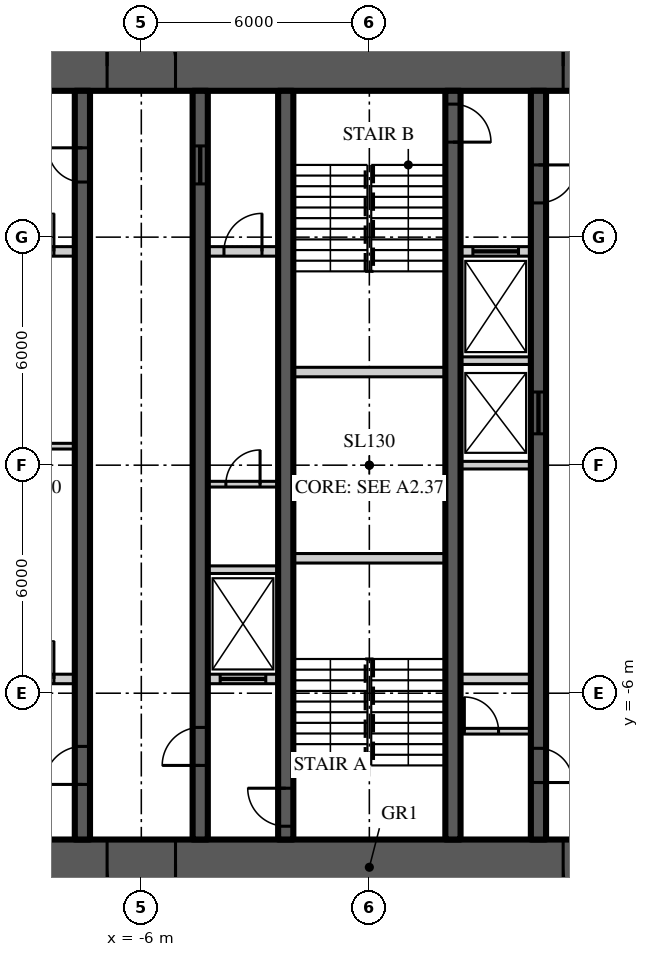
"""IFC4 building model, lengths in metres.
Left out: names, types, materials, properties, quantities, classifications, styles, units other than length and angle.
Written with IfcOpenShell. Run it as: python <this file> out.ifc"""

import sys

from ifc_helpers import new_model, si_unit, direction, frame, frame_2d, origin, place, context, subcontext, project, spatial, rectangle, extrude, element, fill, save


model = new_model("IFC4")
c1 = context("Model", 3, precision=1e-05, world=origin(), true_north=direction((0.0, 1.0)))
c2 = subcontext(c1, "Body", "Model", "MODEL_VIEW")
j1 = project(units=[si_unit("LENGTHUNIT", "METRE"), si_unit("PLANEANGLEUNIT", "RADIAN")], contexts=[c1])
p1 = place(None, origin())
s1 = spatial("IfcSite", under=j1, at=p1, CompositionType="ELEMENT")
p2 = place(p1, origin())
s2 = spatial("IfcBuilding", under=s1, at=p2, CompositionType="ELEMENT")
p3 = place(p2, frame((0.0, 0.0, 290.7)))
s3 = spatial("IfcBuildingStorey", under=s2, at=p3, CompositionType="ELEMENT", Elevation=290.7)
p4 = place(p3, frame((-11.15, 10.5, 0.0), z_axis=(0.0, 0.0, 1.0), x_axis=(1.0, 0.0, 0.0)))
e1 = element("IfcWall", 1, at=p4, inside=s3, PredefinedType="SHEAR", context=c2, shape_type="SweptSolid", body=[
    extrude(rectangle(XDim=22.3, YDim=1.3, at=frame_2d((11.15, 0.0))), origin(), (0.0, 0.0, 1.0), 3.9),
])
p5 = place(p4, frame((4.25, 0.0, 0.0)))
e2 = element("IfcOpeningElement", 2, at=p5, cuts=e1, PredefinedType="OPENING", context=c2, shape_type="SweptSolid", body=[
    extrude(rectangle(XDim=1.8, YDim=2.2, at=frame_2d((0.9, 1.1))), frame((0.0, 0.66, 0.0), z_axis=(0.0, -1.0, 0.0), x_axis=(1.0, 0.0, 0.0)), (0.0, 0.0, 1.0), 1.32),
])
p6 = place(p4, frame((16.25, 0.0, 0.0)))
e3 = element("IfcOpeningElement", 3, at=p6, cuts=e1, PredefinedType="OPENING", context=c2, shape_type="SweptSolid", body=[
    extrude(rectangle(XDim=1.8, YDim=2.2, at=frame_2d((0.9, 1.1))), frame((0.0, 0.66, 0.0), z_axis=(0.0, -1.0, 0.0), x_axis=(1.0, 0.0, 0.0)), (0.0, 0.0, 1.0), 1.32),
])
p7 = place(p3, frame((11.15, -10.5, 0.0), z_axis=(0.0, 0.0, 1.0), x_axis=(-1.0, 0.0, 0.0)))
e4 = element("IfcWall", 4, at=p7, inside=s3, PredefinedType="SHEAR", context=c2, shape_type="SweptSolid", body=[
    extrude(rectangle(XDim=22.3, YDim=1.3, at=frame_2d((11.15, 0.0))), origin(), (0.0, 0.0, 1.0), 3.9),
])
p8 = place(p7, frame((16.25, 0.0, 0.0)))
e5 = element("IfcOpeningElement", 5, at=p8, cuts=e4, PredefinedType="OPENING", context=c2, shape_type="SweptSolid", body=[
    extrude(rectangle(XDim=1.8, YDim=2.2, at=frame_2d((0.9, 1.1))), frame((0.0, 0.66, 0.0), z_axis=(0.0, -1.0, 0.0), x_axis=(1.0, 0.0, 0.0)), (0.0, 0.0, 1.0), 1.32),
])
p9 = place(p7, frame((4.25, 0.0, 0.0)))
e6 = element("IfcOpeningElement", 6, at=p9, cuts=e4, PredefinedType="OPENING", context=c2, shape_type="SweptSolid", body=[
    extrude(rectangle(XDim=1.8, YDim=2.2, at=frame_2d((0.9, 1.1))), frame((0.0, 0.66, 0.0), z_axis=(0.0, -1.0, 0.0), x_axis=(1.0, 0.0, 0.0)), (0.0, 0.0, 1.0), 1.32),
])
p10 = place(p3, frame((-7.55, -9.85, 0.0), z_axis=(0.0, 0.0, 1.0), x_axis=(0.0, 1.0, 0.0)))
e7 = element("IfcWall", 7, at=p10, inside=s3, PredefinedType="SHEAR", context=c2, shape_type="SweptSolid", body=[
    extrude(rectangle(XDim=19.7, YDim=0.4, at=frame_2d((9.85, 0.0))), origin(), (0.0, 0.0, 1.0), 3.9),
])
p11 = place(p10, frame((1.45, 0.0, 0.0)))
e8 = element("IfcOpeningElement", 8, at=p11, cuts=e7, PredefinedType="OPENING", context=c2, shape_type="SweptSolid", body=[
    extrude(rectangle(XDim=1.0, YDim=2.2, at=frame_2d((0.5, 1.1))), frame((0.0, 0.21, 0.0), z_axis=(0.0, -1.0, 0.0), x_axis=(1.0, 0.0, 0.0)), (0.0, 0.0, 1.0), 0.42),
])
p12 = place(p10, frame((17.3, 0.0, 0.0)))
e9 = element("IfcOpeningElement", 9, at=p12, cuts=e7, PredefinedType="OPENING", context=c2, shape_type="SweptSolid", body=[
    extrude(rectangle(XDim=0.9, YDim=2.1, at=frame_2d((0.45, 1.05))), frame((0.0, 0.21, 0.0), z_axis=(0.0, -1.0, 0.0), x_axis=(1.0, 0.0, 0.0)), (0.0, 0.0, 1.0), 0.42),
])
p13 = place(p3, frame((-4.45, -9.85, 0.0), z_axis=(0.0, 0.0, 1.0), x_axis=(0.0, 1.0, 0.0)))
e10 = element("IfcWall", 10, at=p13, inside=s3, PredefinedType="SHEAR", context=c2, shape_type="SweptSolid", body=[
    extrude(rectangle(XDim=19.7, YDim=0.4, at=frame_2d((9.85, 0.0))), origin(), (0.0, 0.0, 1.0), 3.9),
])
p14 = place(p13, frame((1.95, 0.0, 0.0)))
e11 = element("IfcOpeningElement", 11, at=p14, cuts=e10, PredefinedType="OPENING", context=c2, shape_type="SweptSolid", body=[
    extrude(rectangle(XDim=1.0, YDim=2.2, at=frame_2d((0.5, 1.1))), frame((0.0, 0.21, 0.0), z_axis=(0.0, -1.0, 0.0), x_axis=(1.0, 0.0, 0.0)), (0.0, 0.0, 1.0), 0.42),
])
p15 = place(p13, frame((17.25, 0.0, 0.0)))
e12 = element("IfcOpeningElement", 12, at=p15, cuts=e10, PredefinedType="OPENING", context=c2, shape_type="SweptSolid", body=[
    extrude(rectangle(XDim=1.0, YDim=2.1, at=frame_2d((0.5, 1.05))), frame((0.0, 0.21, 0.0), z_axis=(0.0, -1.0, 0.0), x_axis=(1.0, 0.0, 0.0)), (0.0, 0.0, 1.0), 0.42),
])
p16 = place(p3, frame((4.45, 9.85, 0.0), z_axis=(0.0, 0.0, 1.0), x_axis=(0.0, -1.0, 0.0)))
e13 = element("IfcWall", 13, at=p16, inside=s3, PredefinedType="SHEAR", context=c2, shape_type="SweptSolid", body=[
    extrude(rectangle(XDim=19.7, YDim=0.4, at=frame_2d((9.85, 0.0))), origin(), (0.0, 0.0, 1.0), 3.9),
])
p17 = place(p16, frame((1.95, 0.0, 0.0)))
e14 = element("IfcOpeningElement", 14, at=p17, cuts=e13, PredefinedType="OPENING", context=c2, shape_type="SweptSolid", body=[
    extrude(rectangle(XDim=1.0, YDim=2.2, at=frame_2d((0.5, 1.1))), frame((0.0, 0.21, 0.0), z_axis=(0.0, -1.0, 0.0), x_axis=(1.0, 0.0, 0.0)), (0.0, 0.0, 1.0), 0.42),
])
p18 = place(p16, frame((17.3, 0.0, 0.0)))
e15 = element("IfcOpeningElement", 15, at=p18, cuts=e13, PredefinedType="OPENING", context=c2, shape_type="SweptSolid", body=[
    extrude(rectangle(XDim=0.9, YDim=2.1, at=frame_2d((0.45, 1.05))), frame((0.0, 0.21, 0.0), z_axis=(0.0, -1.0, 0.0), x_axis=(1.0, 0.0, 0.0)), (0.0, 0.0, 1.0), 0.42),
])
p19 = place(p16, frame((7.925, 0.0, 0.0)))
e16 = element("IfcOpeningElement", 16, at=p19, cuts=e13, PredefinedType="OPENING", context=c2, shape_type="SweptSolid", body=[
    extrude(rectangle(XDim=1.1, YDim=2.2, at=frame_2d((0.55, 1.1))), frame((0.0, 0.21, 0.0), z_axis=(0.0, -1.0, 0.0), x_axis=(1.0, 0.0, 0.0)), (0.0, 0.0, 1.0), 0.42),
])
p20 = place(p3, frame((-2.2, -9.85, 0.0), z_axis=(0.0, 0.0, 1.0), x_axis=(0.0, 1.0, 0.0)))
e17 = element("IfcWall", 17, at=p20, inside=s3, PredefinedType="SHEAR", context=c2, shape_type="SweptSolid", body=[
    extrude(rectangle(XDim=19.7, YDim=0.4, at=frame_2d((9.85, 0.0))), origin(), (0.0, 0.0, 1.0), 3.9),
])
p21 = place(p20, frame((0.35, 0.0, 0.0)))
e18 = element("IfcOpeningElement", 18, at=p21, cuts=e17, PredefinedType="OPENING", context=c2, shape_type="SweptSolid", body=[
    extrude(rectangle(XDim=1.0, YDim=2.2, at=frame_2d((0.5, 1.1))), frame((0.0, 0.21, 0.0), z_axis=(0.0, -1.0, 0.0), x_axis=(1.0, 0.0, 0.0)), (0.0, 0.0, 1.0), 0.42),
])
p22 = place(p3, frame((2.2, 9.85, 0.0), z_axis=(0.0, 0.0, 1.0), x_axis=(0.0, -1.0, 0.0)))
e19 = element("IfcWall", 19, at=p22, inside=s3, PredefinedType="SHEAR", context=c2, shape_type="SweptSolid", body=[
    extrude(rectangle(XDim=19.7, YDim=0.4, at=frame_2d((9.85, 0.0))), origin(), (0.0, 0.0, 1.0), 3.9),
])
p23 = place(p22, frame((0.35, 0.0, 0.0)))
e20 = element("IfcOpeningElement", 20, at=p23, cuts=e19, PredefinedType="OPENING", context=c2, shape_type="SweptSolid", body=[
    extrude(rectangle(XDim=1.0, YDim=2.2, at=frame_2d((0.5, 1.1))), frame((0.0, 0.21, 0.0), z_axis=(0.0, -1.0, 0.0), x_axis=(1.0, 0.0, 0.0)), (0.0, 0.0, 1.0), 0.42),
])
p24 = place(p3, frame((-9.85, 5.625, 0.0), z_axis=(0.0, 0.0, 1.0), x_axis=(1.0, 0.0, 0.0)))
e21 = element("IfcWall", 21, at=p24, inside=s3, PredefinedType="SOLIDWALL", context=c2, shape_type="SweptSolid", body=[
    extrude(rectangle(XDim=2.1, YDim=0.25, at=frame_2d((1.05, 0.0))), origin(), (0.0, 0.0, 1.0), 3.7),
])
p25 = place(p24, frame((0.55, 0.0, 0.0)))
e22 = element("IfcOpeningElement", 22, at=p25, cuts=e21, PredefinedType="OPENING", context=c2, shape_type="SweptSolid", body=[
    extrude(rectangle(XDim=1.0, YDim=2.2, at=frame_2d((0.5, 1.1))), frame((0.0, 0.135, 0.0), z_axis=(0.0, -1.0, 0.0), x_axis=(1.0, 0.0, 0.0)), (0.0, 0.0, 1.0), 0.27),
])
p26 = place(p3, frame((-4.25, 5.625, 0.0), z_axis=(0.0, 0.0, 1.0), x_axis=(1.0, 0.0, 0.0)))
e23 = element("IfcWall", 23, at=p26, inside=s3, PredefinedType="SOLIDWALL", context=c2, shape_type="SweptSolid", body=[
    extrude(rectangle(XDim=1.85, YDim=0.25, at=frame_2d((0.925, 0.0))), origin(), (0.0, 0.0, 1.0), 3.7),
])
p27 = place(p26, frame((0.425, 0.0, 0.0)))
e24 = element("IfcOpeningElement", 24, at=p27, cuts=e23, PredefinedType="OPENING", context=c2, shape_type="SweptSolid", body=[
    extrude(rectangle(XDim=1.0, YDim=2.2, at=frame_2d((0.5, 1.1))), frame((0.0, 0.135, 0.0), z_axis=(0.0, -1.0, 0.0), x_axis=(1.0, 0.0, 0.0)), (0.0, 0.0, 1.0), 0.27),
])
p28 = place(p3, frame((2.4, 5.625, 0.0), z_axis=(0.0, 0.0, 1.0), x_axis=(1.0, 0.0, 0.0)))
e25 = element("IfcWall", 25, at=p28, inside=s3, PredefinedType="SOLIDWALL", context=c2, shape_type="SweptSolid", body=[
    extrude(rectangle(XDim=1.85, YDim=0.25, at=frame_2d((0.925, 0.0))), origin(), (0.0, 0.0, 1.0), 3.7),
])
p29 = place(p28, frame((0.325, 0.0, 0.0)))
e26 = element("IfcOpeningElement", 26, at=p29, cuts=e25, PredefinedType="OPENING", context=c2, shape_type="SweptSolid", body=[
    extrude(rectangle(XDim=1.2, YDim=2.2, at=frame_2d((0.6, 1.1))), frame((0.0, 0.135, 0.0), z_axis=(0.0, -1.0, 0.0), x_axis=(1.0, 0.0, 0.0)), (0.0, 0.0, 1.0), 0.27),
])
p30 = place(p3, frame((-9.85, -5.625, 0.0), z_axis=(0.0, 0.0, 1.0), x_axis=(1.0, 0.0, 0.0)))
e27 = element("IfcWall", 27, at=p30, inside=s3, PredefinedType="SOLIDWALL", context=c2, shape_type="SweptSolid", body=[
    extrude(rectangle(XDim=2.1, YDim=0.25, at=frame_2d((1.05, 0.0))), origin(), (0.0, 0.0, 1.0), 3.7),
])
p31 = place(p30, frame((0.55, 0.0, 0.0)))
e28 = element("IfcOpeningElement", 28, at=p31, cuts=e27, PredefinedType="OPENING", context=c2, shape_type="SweptSolid", body=[
    extrude(rectangle(XDim=1.0, YDim=2.2, at=frame_2d((0.5, 1.1))), frame((0.0, 0.135, 0.0), z_axis=(0.0, -1.0, 0.0), x_axis=(1.0, 0.0, 0.0)), (0.0, 0.0, 1.0), 0.27),
])
p32 = place(p3, frame((-4.25, -5.625, 0.0), z_axis=(0.0, 0.0, 1.0), x_axis=(1.0, 0.0, 0.0)))
e29 = element("IfcWall", 29, at=p32, inside=s3, PredefinedType="SOLIDWALL", context=c2, shape_type="SweptSolid", body=[
    extrude(rectangle(XDim=1.85, YDim=0.25, at=frame_2d((0.925, 0.0))), origin(), (0.0, 0.0, 1.0), 3.7),
])
p33 = place(p32, frame((0.325, 0.0, 0.0)))
e30 = element("IfcOpeningElement", 30, at=p33, cuts=e29, PredefinedType="OPENING", context=c2, shape_type="SweptSolid", body=[
    extrude(rectangle(XDim=1.2, YDim=2.2, at=frame_2d((0.6, 1.1))), frame((0.0, 0.135, 0.0), z_axis=(0.0, -1.0, 0.0), x_axis=(1.0, 0.0, 0.0)), (0.0, 0.0, 1.0), 0.27),
])
p34 = place(p3, frame((2.4, -5.625, 0.0), z_axis=(0.0, 0.0, 1.0), x_axis=(1.0, 0.0, 0.0)))
e31 = element("IfcWall", 31, at=p34, inside=s3, PredefinedType="SOLIDWALL", context=c2, shape_type="SweptSolid", body=[
    extrude(rectangle(XDim=1.85, YDim=0.25, at=frame_2d((0.925, 0.0))), origin(), (0.0, 0.0, 1.0), 3.7),
])
for number, where, z_axis, x_axis in (
    (32, (-2.0, -2.45, 0.0), (0.0, 0.0, 1.0), (1.0, 0.0, 0.0)),
    (33, (-2.0, 2.45, 0.0), (0.0, 0.0, 1.0), (1.0, 0.0, 0.0)),
):
    element("IfcWall", number, at=place(p3, frame(where, z_axis=z_axis, x_axis=x_axis)), inside=s3, PredefinedType="SOLIDWALL", context=c2, shape_type="SweptSolid", body=[
        extrude(rectangle(XDim=4.0, YDim=0.25, at=frame_2d((2.0, 0.0))), origin(), (0.0, 0.0, 1.0), 3.7),
    ])
for number, where, z_axis, x_axis in (
    (34, (-4.25, -2.75, 0.0), (0.0, 0.0, 1.0), (1.0, 0.0, 0.0)),
    (35, (2.4, 0.0, 0.0), (0.0, 0.0, 1.0), (1.0, 0.0, 0.0)),
    (36, (2.4, 2.75, 0.0), (0.0, 0.0, 1.0), (1.0, 0.0, 0.0)),
):
    element("IfcWall", number, at=place(p3, frame(where, z_axis=z_axis, x_axis=x_axis)), inside=s3, PredefinedType="SOLIDWALL", context=c2, shape_type="SweptSolid", body=[
        extrude(rectangle(XDim=1.85, YDim=0.2, at=frame_2d((0.925, 0.0))), origin(), (0.0, 0.0, 1.0), 3.7),
    ])
p35 = place(p3, frame((-9.85, 0.5, 0.0), z_axis=(0.0, 0.0, 1.0), x_axis=(1.0, 0.0, 0.0)))
e37 = element("IfcWall", 37, at=p35, inside=s3, PredefinedType="SOLIDWALL", context=c2, shape_type="SweptSolid", body=[
    extrude(rectangle(XDim=2.1, YDim=0.15, at=frame_2d((1.05, 0.0))), origin(), (0.0, 0.0, 1.0), 3.77),
])
p36 = place(p3, frame((-4.25, -0.5, 0.0), z_axis=(0.0, 0.0, 1.0), x_axis=(1.0, 0.0, 0.0)))
e38 = element("IfcWall", 38, at=p36, inside=s3, PredefinedType="SOLIDWALL", context=c2, shape_type="SweptSolid", body=[
    extrude(rectangle(XDim=1.85, YDim=0.15, at=frame_2d((0.925, 0.0))), origin(), (0.0, 0.0, 1.0), 3.77),
])
p37 = place(p36, frame((0.475, 0.0, 0.0)))
e39 = element("IfcOpeningElement", 39, at=p37, cuts=e38, PredefinedType="OPENING", context=c2, shape_type="SweptSolid", body=[
    extrude(rectangle(XDim=0.9, YDim=2.1, at=frame_2d((0.45, 1.05))), frame((0.0, 0.085, 0.0), z_axis=(0.0, -1.0, 0.0), x_axis=(1.0, 0.0, 0.0)), (0.0, 0.0, 1.0), 0.17),
])
p38 = place(p3, frame((2.4, -7.0, 0.0), z_axis=(0.0, 0.0, 1.0), x_axis=(1.0, 0.0, 0.0)))
e40 = element("IfcWall", 40, at=p38, inside=s3, PredefinedType="SOLIDWALL", context=c2, shape_type="SweptSolid", body=[
    extrude(rectangle(XDim=1.85, YDim=0.15, at=frame_2d((0.925, 0.0))), origin(), (0.0, 0.0, 1.0), 3.77),
])
p39 = place(p38, frame((0.1, 0.0, 0.0)))
e41 = element("IfcOpeningElement", 41, at=p39, cuts=e40, PredefinedType="OPENING", context=c2, shape_type="SweptSolid", body=[
    extrude(rectangle(XDim=0.9, YDim=2.1, at=frame_2d((0.45, 1.05))), frame((0.0, 0.085, 0.0), z_axis=(0.0, -1.0, 0.0), x_axis=(1.0, 0.0, 0.0)), (0.0, 0.0, 1.0), 0.17),
])
p40 = place(p5, origin())
e42 = element("IfcDoor", 42, at=p40, inside=s3, OperationType="DOUBLE_DOOR_DOUBLE_SWING", PredefinedType="DOOR", context=c2, shape_type="SweptSolid", body=[
    extrude(rectangle(XDim=1.8, YDim=2.2, at=frame_2d((0.9, 1.1))), frame((0.0, 0.025, 0.0), z_axis=(0.0, -1.0, 0.0), x_axis=(1.0, 0.0, 0.0)), (0.0, 0.0, 1.0), 0.05),
])
fill(e2, e42)
p41 = place(p8, origin())
e43 = element("IfcDoor", 43, at=p41, inside=s3, OperationType="DOUBLE_DOOR_DOUBLE_SWING", PredefinedType="DOOR", context=c2, shape_type="SweptSolid", body=[
    extrude(rectangle(XDim=1.8, YDim=2.2, at=frame_2d((0.9, 1.1))), frame((0.0, 0.025, 0.0), z_axis=(0.0, -1.0, 0.0), x_axis=(1.0, 0.0, 0.0)), (0.0, 0.0, 1.0), 0.05),
])
fill(e5, e43)
p42 = place(p6, origin())
e44 = element("IfcDoor", 44, at=p42, inside=s3, OperationType="DOUBLE_DOOR_DOUBLE_SWING", PredefinedType="DOOR", context=c2, shape_type="SweptSolid", body=[
    extrude(rectangle(XDim=1.8, YDim=2.2, at=frame_2d((0.9, 1.1))), frame((0.0, 0.025, 0.0), z_axis=(0.0, -1.0, 0.0), x_axis=(1.0, 0.0, 0.0)), (0.0, 0.0, 1.0), 0.05),
])
fill(e3, e44)
p43 = place(p9, origin())
e45 = element("IfcDoor", 45, at=p43, inside=s3, OperationType="DOUBLE_DOOR_DOUBLE_SWING", PredefinedType="DOOR", context=c2, shape_type="SweptSolid", body=[
    extrude(rectangle(XDim=1.8, YDim=2.2, at=frame_2d((0.9, 1.1))), frame((0.0, 0.025, 0.0), z_axis=(0.0, -1.0, 0.0), x_axis=(1.0, 0.0, 0.0)), (0.0, 0.0, 1.0), 0.05),
])
fill(e6, e45)
p44 = place(p11, origin())
e46 = element("IfcDoor", 46, at=p44, inside=s3, OperationType="SINGLE_SWING_LEFT", PredefinedType="DOOR", context=c2, shape_type="SweptSolid", body=[
    extrude(rectangle(XDim=1.0, YDim=2.2, at=frame_2d((0.5, 1.1))), frame((0.0, 0.025, 0.0), z_axis=(0.0, -1.0, 0.0), x_axis=(1.0, 0.0, 0.0)), (0.0, 0.0, 1.0), 0.05),
])
fill(e8, e46)
p45 = place(p14, origin())
e47 = element("IfcDoor", 47, at=p45, inside=s3, OperationType="SINGLE_SWING_LEFT", PredefinedType="DOOR", context=c2, shape_type="SweptSolid", body=[
    extrude(rectangle(XDim=1.0, YDim=2.2, at=frame_2d((0.5, 1.1))), frame((0.0, 0.025, 0.0), z_axis=(0.0, -1.0, 0.0), x_axis=(1.0, 0.0, 0.0)), (0.0, 0.0, 1.0), 0.05),
])
fill(e11, e47)
p46 = place(p21, origin())
e48 = element("IfcDoor", 48, at=p46, inside=s3, OperationType="SINGLE_SWING_RIGHT", PredefinedType="DOOR", context=c2, shape_type="SweptSolid", body=[
    extrude(rectangle(XDim=1.0, YDim=2.2, at=frame_2d((0.5, 1.1))), frame((0.0, 0.025, 0.0), z_axis=(0.0, -1.0, 0.0), x_axis=(1.0, 0.0, 0.0)), (0.0, 0.0, 1.0), 0.05),
])
fill(e18, e48)
p47 = place(p17, origin())
e49 = element("IfcDoor", 49, at=p47, inside=s3, OperationType="SINGLE_SWING_LEFT", PredefinedType="DOOR", context=c2, shape_type="SweptSolid", body=[
    extrude(rectangle(XDim=1.0, YDim=2.2, at=frame_2d((0.5, 1.1))), frame((0.0, 0.025, 0.0), z_axis=(0.0, -1.0, 0.0), x_axis=(1.0, 0.0, 0.0)), (0.0, 0.0, 1.0), 0.05),
])
fill(e14, e49)
p48 = place(p23, origin())
e50 = element("IfcDoor", 50, at=p48, inside=s3, OperationType="SINGLE_SWING_RIGHT", PredefinedType="DOOR", context=c2, shape_type="SweptSolid", body=[
    extrude(rectangle(XDim=1.0, YDim=2.2, at=frame_2d((0.5, 1.1))), frame((0.0, 0.025, 0.0), z_axis=(0.0, -1.0, 0.0), x_axis=(1.0, 0.0, 0.0)), (0.0, 0.0, 1.0), 0.05),
])
fill(e20, e50)
p49 = place(p12, origin())
e51 = element("IfcDoor", 51, at=p49, inside=s3, OperationType="SINGLE_SWING_RIGHT", PredefinedType="DOOR", context=c2, shape_type="SweptSolid", body=[
    extrude(rectangle(XDim=0.9, YDim=2.1, at=frame_2d((0.45, 1.05))), frame((0.0, 0.025, 0.0), z_axis=(0.0, -1.0, 0.0), x_axis=(1.0, 0.0, 0.0)), (0.0, 0.0, 1.0), 0.05),
])
fill(e9, e51)
p50 = place(p15, origin())
e52 = element("IfcDoor", 52, at=p50, inside=s3, OperationType="SLIDING_TO_LEFT", PredefinedType="DOOR", context=c2, shape_type="SweptSolid", body=[
    extrude(rectangle(XDim=1.0, YDim=2.1, at=frame_2d((0.5, 1.05))), frame((0.0, 0.025, 0.0), z_axis=(0.0, -1.0, 0.0), x_axis=(1.0, 0.0, 0.0)), (0.0, 0.0, 1.0), 0.05),
])
fill(e12, e52)
p51 = place(p18, origin())
e53 = element("IfcDoor", 53, at=p51, inside=s3, OperationType="SINGLE_SWING_RIGHT", PredefinedType="DOOR", context=c2, shape_type="SweptSolid", body=[
    extrude(rectangle(XDim=0.9, YDim=2.1, at=frame_2d((0.45, 1.05))), frame((0.0, 0.025, 0.0), z_axis=(0.0, -1.0, 0.0), x_axis=(1.0, 0.0, 0.0)), (0.0, 0.0, 1.0), 0.05),
])
fill(e15, e53)
p52 = place(p19, origin())
e54 = element("IfcDoor", 54, at=p52, inside=s3, OperationType="SLIDING_TO_LEFT", PredefinedType="DOOR", context=c2, shape_type="SweptSolid", body=[
    extrude(rectangle(XDim=1.1, YDim=2.2, at=frame_2d((0.55, 1.1))), frame((0.0, 0.025, 0.0), z_axis=(0.0, -1.0, 0.0), x_axis=(1.0, 0.0, 0.0)), (0.0, 0.0, 1.0), 0.05),
])
fill(e16, e54)
p53 = place(p33, origin())
e55 = element("IfcDoor", 55, at=p53, inside=s3, OperationType="SLIDING_TO_LEFT", PredefinedType="DOOR", context=c2, shape_type="SweptSolid", body=[
    extrude(rectangle(XDim=1.2, YDim=2.2, at=frame_2d((0.6, 1.1))), frame((0.0, 0.025, 0.0), z_axis=(0.0, -1.0, 0.0), x_axis=(1.0, 0.0, 0.0)), (0.0, 0.0, 1.0), 0.05),
])
fill(e30, e55)
p54 = place(p29, origin())
e56 = element("IfcDoor", 56, at=p54, inside=s3, OperationType="SLIDING_TO_LEFT", PredefinedType="DOOR", context=c2, shape_type="SweptSolid", body=[
    extrude(rectangle(XDim=1.2, YDim=2.2, at=frame_2d((0.6, 1.1))), frame((0.0, 0.025, 0.0), z_axis=(0.0, -1.0, 0.0), x_axis=(1.0, 0.0, 0.0)), (0.0, 0.0, 1.0), 0.05),
])
fill(e26, e56)
p55 = place(p25, origin())
e57 = element("IfcDoor", 57, at=p55, inside=s3, OperationType="SINGLE_SWING_RIGHT", PredefinedType="DOOR", context=c2, shape_type="SweptSolid", body=[
    extrude(rectangle(XDim=1.0, YDim=2.2, at=frame_2d((0.5, 1.1))), frame((0.0, 0.025, 0.0), z_axis=(0.0, -1.0, 0.0), x_axis=(1.0, 0.0, 0.0)), (0.0, 0.0, 1.0), 0.05),
])
fill(e22, e57)
p56 = place(p31, origin())
e58 = element("IfcDoor", 58, at=p56, inside=s3, OperationType="SINGLE_SWING_RIGHT", PredefinedType="DOOR", context=c2, shape_type="SweptSolid", body=[
    extrude(rectangle(XDim=1.0, YDim=2.2, at=frame_2d((0.5, 1.1))), frame((0.0, 0.025, 0.0), z_axis=(0.0, -1.0, 0.0), x_axis=(1.0, 0.0, 0.0)), (0.0, 0.0, 1.0), 0.05),
])
fill(e28, e58)
p57 = place(p37, origin())
e59 = element("IfcDoor", 59, at=p57, inside=s3, OperationType="SINGLE_SWING_RIGHT", PredefinedType="DOOR", context=c2, shape_type="SweptSolid", body=[
    extrude(rectangle(XDim=0.9, YDim=2.1, at=frame_2d((0.45, 1.05))), frame((0.0, 0.025, 0.0), z_axis=(0.0, -1.0, 0.0), x_axis=(1.0, 0.0, 0.0)), (0.0, 0.0, 1.0), 0.05),
])
fill(e39, e59)
p58 = place(p27, origin())
e60 = element("IfcDoor", 60, at=p58, inside=s3, OperationType="SINGLE_SWING_RIGHT", PredefinedType="DOOR", context=c2, shape_type="SweptSolid", body=[
    extrude(rectangle(XDim=1.0, YDim=2.2, at=frame_2d((0.5, 1.1))), frame((0.0, 0.025, 0.0), z_axis=(0.0, -1.0, 0.0), x_axis=(1.0, 0.0, 0.0)), (0.0, 0.0, 1.0), 0.05),
])
fill(e24, e60)
p59 = place(p39, origin())
e61 = element("IfcDoor", 61, at=p59, inside=s3, OperationType="SINGLE_SWING_LEFT", PredefinedType="DOOR", context=c2, shape_type="SweptSolid", body=[
    extrude(rectangle(XDim=0.9, YDim=2.1, at=frame_2d((0.45, 1.05))), frame((0.0, 0.025, 0.0), z_axis=(0.0, -1.0, 0.0), x_axis=(1.0, 0.0, 0.0)), (0.0, 0.0, 1.0), 0.05),
])
fill(e41, e61)
save(model, sys.argv[1])
